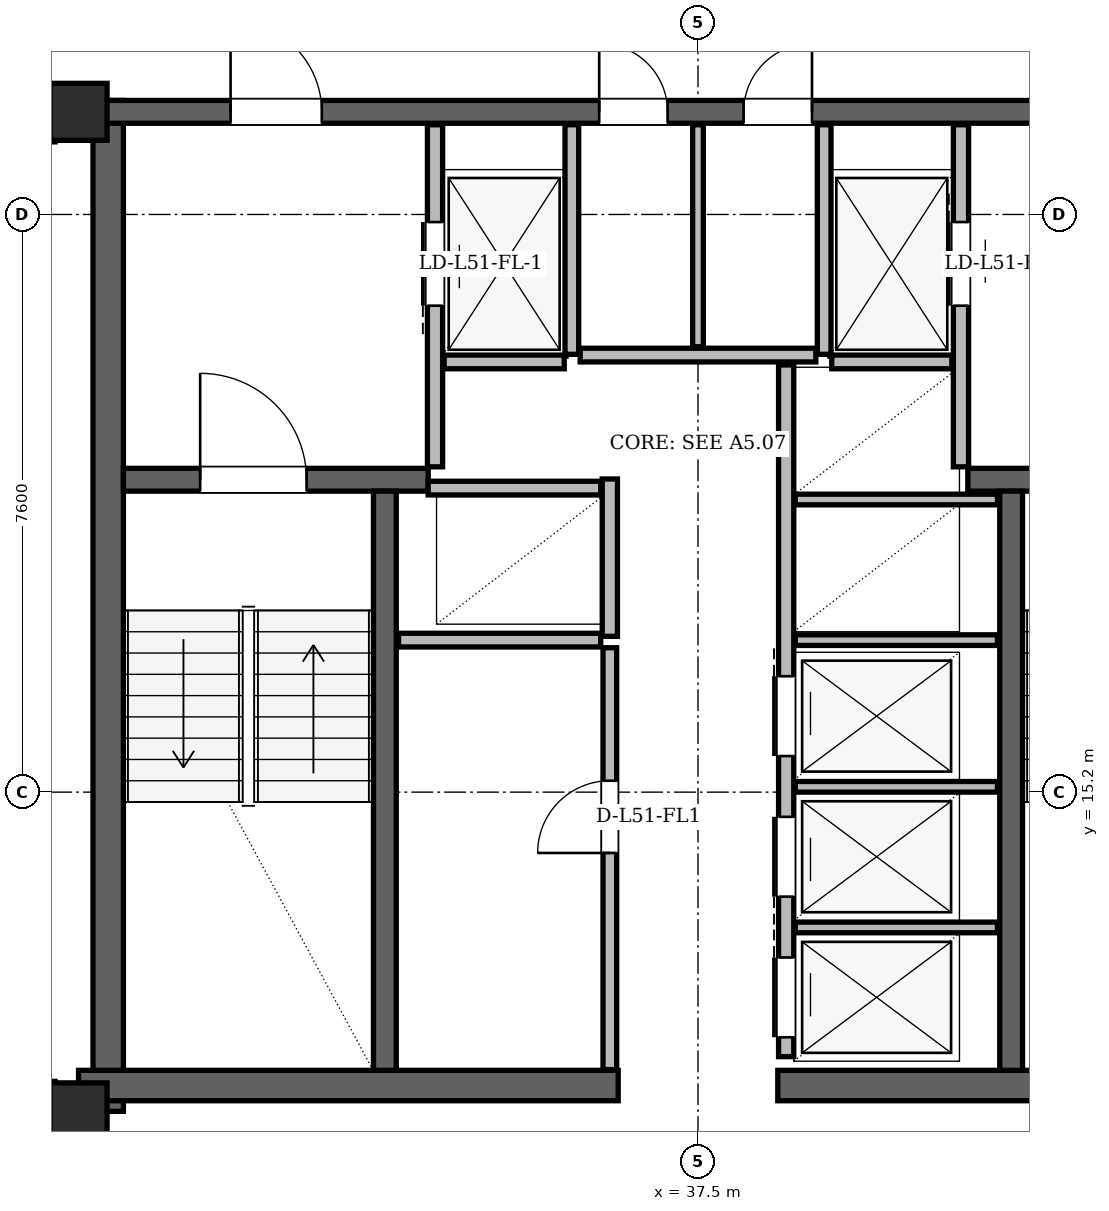
"""IFC4 building model, lengths in metres.
Left out: names, types, materials, properties, quantities, classifications, styles, units other than length and angle.
Written with IfcOpenShell. Run it as: python <this file> out.ifc"""

import sys

from ifc_helpers import new_model, si_unit, direction, frame, frame_2d, origin, origin_2d, place, context, subcontext, project, spatial, rectangle, hollow_rectangle, extrude, element, fill, save


model = new_model("IFC4")
c1 = context("Model", 3, precision=1e-05, world=origin(), true_north=direction((0.0, 1.0)))
c2 = subcontext(c1, "Body", "Model", "MODEL_VIEW")
j1 = project(units=[si_unit("LENGTHUNIT", "METRE"), si_unit("PLANEANGLEUNIT", "RADIAN")], contexts=[c1])
p1 = place(None, origin())
s1 = spatial("IfcSite", under=j1, at=p1, CompositionType="ELEMENT")
p2 = place(p1, origin())
s2 = spatial("IfcBuilding", under=s1, at=p2, CompositionType="ELEMENT")
p3 = place(p2, frame((0.0, 0.0, 193.8)))
s3 = spatial("IfcBuildingStorey", under=s2, at=p3, CompositionType="ELEMENT", Elevation=193.8)
for number, where, z_axis, x_axis in (
    (1, (29.35, 11.0, 0.0), (0.0, 0.0, 1.0), (1.0, 0.0, 0.0)),
    (2, (29.35, 24.15, 0.0), (0.0, 0.0, 1.0), (1.0, 0.0, 0.0)),
):
    element("IfcColumn", number, at=place(p3, frame(where, z_axis=z_axis, x_axis=x_axis)), inside=s3, PredefinedType="COLUMN", context=c2, shape_type="SweptSolid", body=[
        extrude(hollow_rectangle(XDim=0.75, YDim=0.75, WallThickness=0.06, at=origin_2d()), origin(), (0.0, 0.0, 1.0), 3.6),
    ])
p4 = place(p3, frame((29.74, 11.0, 0.0), z_axis=(0.0, 0.0, 1.0), x_axis=(0.0, 1.0, 0.0)))
e3 = element("IfcWall", 3, at=p4, inside=s3, PredefinedType="SHEAR", context=c2, shape_type="SweptSolid", body=[
    extrude(rectangle(XDim=13.3, YDim=0.4, at=frame_2d((6.65, 0.0))), origin(), (0.0, 0.0, 1.0), 3.38),
])
for number, where, z_axis, x_axis in (
    (4, (29.35, 11.34, 0.0), (0.0, 0.0, 1.0), (1.0, 0.0, 0.0)),
    (5, (38.55, 11.34, 0.0), (0.0, 0.0, 1.0), (1.0, 0.0, 0.0)),
):
    element("IfcWall", number, at=place(p3, frame(where, z_axis=z_axis, x_axis=x_axis)), inside=s3, PredefinedType="SHEAR", context=c2, shape_type="SweptSolid", body=[
        extrude(rectangle(XDim=7.1, YDim=0.4, at=frame_2d((3.55, 0.0))), origin(), (0.0, 0.0, 1.0), 3.38),
    ])
p5 = place(p3, frame((29.65, 24.15, 0.0), z_axis=(0.0, 0.0, 1.0), x_axis=(1.0, 0.0, 0.0)))
e6 = element("IfcWall", 6, at=p5, inside=s3, PredefinedType="SHEAR", context=c2, shape_type="SweptSolid", body=[
    extrude(rectangle(XDim=15.7, YDim=0.3, at=frame_2d((7.85, 0.0))), origin(), (0.0, 0.0, 1.0), 3.38),
])
p6 = place(p5, frame((1.7, 0.0, 0.0)))
e7 = element("IfcOpeningElement", 7, at=p6, cuts=e6, PredefinedType="OPENING", context=c2, shape_type="SweptSolid", body=[
    extrude(rectangle(XDim=1.2, YDim=2.2, at=frame_2d((0.6, 1.1))), frame((0.0, 0.15, 0.0), z_axis=(0.0, -1.0, 0.0), x_axis=(1.0, 0.0, 0.0)), (0.0, 0.0, 1.0), 0.3),
])
p7 = place(p5, frame((12.8, 0.0, 0.0)))
e8 = element("IfcOpeningElement", 8, at=p7, cuts=e6, PredefinedType="OPENING", context=c2, shape_type="SweptSolid", body=[
    extrude(rectangle(XDim=1.2, YDim=2.2, at=frame_2d((0.6, 1.1))), frame((0.0, 0.15, 0.0), z_axis=(0.0, -1.0, 0.0), x_axis=(1.0, 0.0, 0.0)), (0.0, 0.0, 1.0), 0.3),
])
p8 = place(p5, frame((6.55, 0.0, 0.0)))
e9 = element("IfcOpeningElement", 9, at=p8, cuts=e6, PredefinedType="OPENING", context=c2, shape_type="SweptSolid", body=[
    extrude(rectangle(XDim=0.9, YDim=2.05, at=frame_2d((0.45, 1.025))), frame((0.0, 0.15, 0.0), z_axis=(0.0, -1.0, 0.0), x_axis=(1.0, 0.0, 0.0)), (0.0, 0.0, 1.0), 0.3),
])
p9 = place(p5, frame((8.45, 0.0, 0.0)))
e10 = element("IfcOpeningElement", 10, at=p9, cuts=e6, PredefinedType="OPENING", context=c2, shape_type="SweptSolid", body=[
    extrude(rectangle(XDim=0.9, YDim=2.05, at=frame_2d((0.45, 1.025))), frame((0.0, 0.15, 0.0), z_axis=(0.0, -1.0, 0.0), x_axis=(1.0, 0.0, 0.0)), (0.0, 0.0, 1.0), 0.3),
])
p10 = place(p3, frame((29.94, 19.31, 0.0), z_axis=(0.0, 0.0, 1.0), x_axis=(1.0, 0.0, 0.0)))
e11 = element("IfcWall", 11, at=p10, inside=s3, PredefinedType="SHEAR", context=c2, shape_type="SweptSolid", body=[
    extrude(rectangle(XDim=4.01, YDim=0.3, at=frame_2d((2.005, 0.0))), origin(), (0.0, 0.0, 1.0), 3.38),
])
p11 = place(p10, frame((1.01, 0.0, 0.0)))
e12 = element("IfcOpeningElement", 12, at=p11, cuts=e11, PredefinedType="OPENING", context=c2, shape_type="SweptSolid", body=[
    extrude(rectangle(XDim=1.4, YDim=2.2, at=frame_2d((0.7, 1.1))), frame((0.0, 0.15, 0.0), z_axis=(0.0, -1.0, 0.0), x_axis=(1.0, 0.0, 0.0)), (0.0, 0.0, 1.0), 0.3),
])
p12 = place(p3, frame((41.05, 19.31, 0.0), z_axis=(0.0, 0.0, 1.0), x_axis=(1.0, 0.0, 0.0)))
e13 = element("IfcWall", 13, at=p12, inside=s3, PredefinedType="SHEAR", context=c2, shape_type="SweptSolid", body=[
    extrude(rectangle(XDim=4.01, YDim=0.3, at=frame_2d((2.005, 0.0))), origin(), (0.0, 0.0, 1.0), 3.38),
])
p13 = place(p12, frame((1.6, 0.0, 0.0)))
e14 = element("IfcOpeningElement", 14, at=p13, cuts=e13, PredefinedType="OPENING", context=c2, shape_type="SweptSolid", body=[
    extrude(rectangle(XDim=1.4, YDim=2.2, at=frame_2d((0.7, 1.1))), frame((0.0, 0.15, 0.0), z_axis=(0.0, -1.0, 0.0), x_axis=(1.0, 0.0, 0.0)), (0.0, 0.0, 1.0), 0.3),
])
for number, where, z_axis, x_axis in (
    (15, (33.38, 11.54, 0.0), (0.0, 0.0, 1.0), (0.0, 1.0, 0.0)),
    (16, (41.62, 11.54, 0.0), (0.0, 0.0, 1.0), (0.0, 1.0, 0.0)),
):
    element("IfcWall", number, at=place(p3, frame(where, z_axis=z_axis, x_axis=x_axis)), inside=s3, PredefinedType="SHEAR", context=c2, shape_type="SweptSolid", body=[
        extrude(rectangle(XDim=7.62, YDim=0.3, at=frame_2d((3.81, 0.0))), origin(), (0.0, 0.0, 1.0), 3.38),
    ])
p14 = place(p3, frame((59.426, 11.839, 0.0), z_axis=(0.0, 0.0, 1.0), x_axis=(-0.499997159266, 0.866027043877, 0.0)))
e17 = element("IfcWall", 17, at=p14, inside=s3, PredefinedType="SOLIDWALL", context=c2, shape_type="SweptSolid", body=[
    extrude(rectangle(XDim=36.235, YDim=0.29, at=frame_2d((18.117, 0.0))), origin(), (0.0, 0.0, 1.0), 2.677),
])
p15 = place(p14, frame((6.579, 0.0, 0.0)))
e18 = element("IfcOpeningElement", 18, at=p15, cuts=e17, PredefinedType="OPENING", context=c2, shape_type="SweptSolid", body=[
    extrude(rectangle(XDim=1.5, YDim=2.2, at=frame_2d((0.75, 1.1))), frame((0.0, 0.145, 0.0), z_axis=(0.0, -1.0, 0.0), x_axis=(1.0, 0.0, 0.0)), (0.0, 0.0, 1.0), 0.29),
])
p16 = place(p14, frame((26.7, 0.0, 0.0)))
e19 = element("IfcOpeningElement", 19, at=p16, cuts=e17, PredefinedType="OPENING", context=c2, shape_type="SweptSolid", body=[
    extrude(rectangle(XDim=1.5, YDim=2.2, at=frame_2d((0.75, 1.1))), frame((0.0, 0.145, 0.0), z_axis=(0.0, -1.0, 0.0), x_axis=(1.0, 0.0, 0.0)), (0.0, 0.0, 1.0), 0.29),
])
p17 = place(p14, frame((34.18, 0.0, 0.85)))
e20 = element("IfcOpeningElement", 20, at=p17, cuts=e17, PredefinedType="OPENING", context=c2, shape_type="SweptSolid", body=[
    extrude(rectangle(XDim=1.2, YDim=1.48, at=frame_2d((0.6, 0.74))), frame((0.0, 0.145, 0.0), z_axis=(0.0, -1.0, 0.0), x_axis=(1.0, 0.0, 0.0)), (0.0, 0.0, 1.0), 0.29),
])
p18 = place(p14, frame((16.442, 0.0, 0.85)))
e21 = element("IfcOpeningElement", 21, at=p18, cuts=e17, PredefinedType="OPENING", context=c2, shape_type="SweptSolid", body=[
    extrude(rectangle(XDim=2.5, YDim=1.717, at=frame_2d((1.25, 0.858))), frame((0.0, 0.145, 0.0), z_axis=(0.0, -1.0, 0.0), x_axis=(1.0, 0.0, 0.0)), (0.0, 0.0, 1.0), 0.29),
])
p19 = place(p3, frame((33.691, 43.219, 0.0), z_axis=(0.0, 0.0, 1.0), x_axis=(-0.499997159266, -0.866027043877, 0.0)))
e22 = element("IfcWall", 22, at=p19, inside=s3, PredefinedType="SOLIDWALL", context=c2, shape_type="SweptSolid", body=[
    extrude(rectangle(XDim=36.235, YDim=0.29, at=frame_2d((18.117, 0.0))), origin(), (0.0, 0.0, 1.0), 2.677),
])
p20 = place(p19, frame((6.579, 0.0, 0.0)))
e23 = element("IfcOpeningElement", 23, at=p20, cuts=e22, PredefinedType="OPENING", context=c2, shape_type="SweptSolid", body=[
    extrude(rectangle(XDim=1.5, YDim=2.2, at=frame_2d((0.75, 1.1))), frame((0.0, 0.145, 0.0), z_axis=(0.0, -1.0, 0.0), x_axis=(1.0, 0.0, 0.0)), (0.0, 0.0, 1.0), 0.29),
])
p21 = place(p19, frame((26.7, 0.0, 0.0)))
e24 = element("IfcOpeningElement", 24, at=p21, cuts=e22, PredefinedType="OPENING", context=c2, shape_type="SweptSolid", body=[
    extrude(rectangle(XDim=1.5, YDim=2.2, at=frame_2d((0.75, 1.1))), frame((0.0, 0.145, 0.0), z_axis=(0.0, -1.0, 0.0), x_axis=(1.0, 0.0, 0.0)), (0.0, 0.0, 1.0), 0.29),
])
p22 = place(p19, frame((32.74, 0.0, 0.85)))
e25 = element("IfcOpeningElement", 25, at=p22, cuts=e22, PredefinedType="OPENING", context=c2, shape_type="SweptSolid", body=[
    extrude(rectangle(XDim=2.4, YDim=1.717, at=frame_2d((1.2, 0.858))), frame((0.0, 0.145, 0.0), z_axis=(0.0, -1.0, 0.0), x_axis=(1.0, 0.0, 0.0)), (0.0, 0.0, 1.0), 0.29),
])
p23 = place(p19, frame((21.971, 0.0, 0.85)))
e26 = element("IfcOpeningElement", 26, at=p23, cuts=e22, PredefinedType="OPENING", context=c2, shape_type="SweptSolid", body=[
    extrude(rectangle(XDim=2.0, YDim=1.717, at=frame_2d((1.0, 0.858))), frame((0.0, 0.145, 0.0), z_axis=(0.0, -1.0, 0.0), x_axis=(1.0, 0.0, 0.0)), (0.0, 0.0, 1.0), 0.29),
])
p24 = place(p19, frame((2.383, 0.0, 0.85)))
e27 = element("IfcOpeningElement", 27, at=p24, cuts=e22, PredefinedType="OPENING", context=c2, shape_type="SweptSolid", body=[
    extrude(rectangle(XDim=1.6, YDim=1.7, at=frame_2d((0.8, 0.85))), frame((0.0, 0.145, 0.0), z_axis=(0.0, -1.0, 0.0), x_axis=(1.0, 0.0, 0.0)), (0.0, 0.0, 1.0), 0.29),
])
p25 = place(p19, frame((13.348, 0.0, 0.85)))
e28 = element("IfcOpeningElement", 28, at=p25, cuts=e22, PredefinedType="OPENING", context=c2, shape_type="SweptSolid", body=[
    extrude(rectangle(XDim=3.0, YDim=1.717, at=frame_2d((1.5, 0.858))), frame((0.0, 0.145, 0.0), z_axis=(0.0, -1.0, 0.0), x_axis=(1.0, 0.0, 0.0)), (0.0, 0.0, 1.0), 0.29),
])
p26 = place(p3, frame((34.04, 19.48, 0.0), z_axis=(0.0, 0.0, 1.0), x_axis=(0.0, 1.0, 0.0)))
e29 = element("IfcWall", 29, at=p26, inside=s3, PredefinedType="PARTITIONING", context=c2, shape_type="SweptSolid", body=[
    extrude(rectangle(XDim=4.5, YDim=0.2, at=frame_2d((2.25, 0.0))), origin(), (0.0, 0.0, 1.0), 3.38),
])
p27 = place(p26, frame((2.12, 0.0, 0.0)))
e30 = element("IfcOpeningElement", 30, at=p27, cuts=e29, PredefinedType="OPENING", context=c2, shape_type="SweptSolid", body=[
    extrude(rectangle(XDim=1.1, YDim=2.2, at=frame_2d((0.55, 1.1))), frame((0.0, 0.1, 0.0), z_axis=(0.0, -1.0, 0.0), x_axis=(1.0, 0.0, 0.0)), (0.0, 0.0, 1.0), 0.2),
])
p28 = place(p3, frame((35.84, 20.96, 0.0), z_axis=(0.0, 0.0, 1.0), x_axis=(0.0, 1.0, 0.0)))
e31 = element("IfcWall", 31, at=p28, inside=s3, PredefinedType="PARTITIONING", context=c2, shape_type="SweptSolid", body=[
    extrude(rectangle(XDim=3.02, YDim=0.18, at=frame_2d((1.51, 0.0))), origin(), (0.0, 0.0, 1.0), 3.38),
])
p29 = place(p3, frame((34.16, 20.86, 0.0), z_axis=(0.0, 0.0, 1.0), x_axis=(1.0, 0.0, 0.0)))
e32 = element("IfcWall", 32, at=p29, inside=s3, PredefinedType="PARTITIONING", context=c2, shape_type="SweptSolid", body=[
    extrude(rectangle(XDim=1.58, YDim=0.18, at=frame_2d((0.79, 0.0))), origin(), (0.0, 0.0, 1.0), 3.38),
])
p30 = place(p3, frame((40.96, 19.48, 0.0), z_axis=(0.0, 0.0, 1.0), x_axis=(0.0, 1.0, 0.0)))
e33 = element("IfcWall", 33, at=p30, inside=s3, PredefinedType="PARTITIONING", context=c2, shape_type="SweptSolid", body=[
    extrude(rectangle(XDim=4.5, YDim=0.2, at=frame_2d((2.25, 0.0))), origin(), (0.0, 0.0, 1.0), 3.38),
])
p31 = place(p30, frame((2.12, 0.0, 0.0)))
e34 = element("IfcOpeningElement", 34, at=p31, cuts=e33, PredefinedType="OPENING", context=c2, shape_type="SweptSolid", body=[
    extrude(rectangle(XDim=1.1, YDim=2.2, at=frame_2d((0.55, 1.1))), frame((0.0, 0.1, 0.0), z_axis=(0.0, -1.0, 0.0), x_axis=(1.0, 0.0, 0.0)), (0.0, 0.0, 1.0), 0.2),
])
p32 = place(p3, frame((39.16, 20.96, 0.0), z_axis=(0.0, 0.0, 1.0), x_axis=(0.0, 1.0, 0.0)))
e35 = element("IfcWall", 35, at=p32, inside=s3, PredefinedType="PARTITIONING", context=c2, shape_type="SweptSolid", body=[
    extrude(rectangle(XDim=3.02, YDim=0.18, at=frame_2d((1.51, 0.0))), origin(), (0.0, 0.0, 1.0), 3.38),
])
p33 = place(p3, frame((39.26, 20.86, 0.0), z_axis=(0.0, 0.0, 1.0), x_axis=(1.0, 0.0, 0.0)))
e36 = element("IfcWall", 36, at=p33, inside=s3, PredefinedType="PARTITIONING", context=c2, shape_type="SweptSolid", body=[
    extrude(rectangle(XDim=1.58, YDim=0.18, at=frame_2d((0.79, 0.0))), origin(), (0.0, 0.0, 1.0), 3.38),
])
p34 = place(p3, frame((36.34, 17.25, 0.0), z_axis=(0.0, 0.0, 1.0), x_axis=(0.0, 1.0, 0.0)))
e37 = element("IfcWall", 37, at=p34, inside=s3, PredefinedType="PARTITIONING", context=c2, shape_type="SweptSolid", body=[
    extrude(rectangle(XDim=2.07, YDim=0.2, at=frame_2d((1.035, 0.0))), origin(), (0.0, 0.0, 1.0), 3.38),
])
p35 = place(p3, frame((33.95, 19.2, 0.0), z_axis=(0.0, 0.0, 1.0), x_axis=(1.0, 0.0, 0.0)))
e38 = element("IfcWall", 38, at=p35, inside=s3, PredefinedType="PARTITIONING", context=c2, shape_type="SweptSolid", body=[
    extrude(rectangle(XDim=2.27, YDim=0.18, at=frame_2d((1.135, 0.0))), origin(), (0.0, 0.0, 1.0), 3.38),
])
p36 = place(p3, frame((33.56, 17.2, 0.0), z_axis=(0.0, 0.0, 1.0), x_axis=(1.0, 0.0, 0.0)))
e39 = element("IfcWall", 39, at=p36, inside=s3, PredefinedType="PARTITIONING", context=c2, shape_type="SweptSolid", body=[
    extrude(rectangle(XDim=2.66, YDim=0.18, at=frame_2d((1.33, 0.0))), origin(), (0.0, 0.0, 1.0), 3.38),
])
p37 = place(p3, frame((36.34, 11.55, 0.0), z_axis=(0.0, 0.0, 1.0), x_axis=(0.0, 1.0, 0.0)))
e40 = element("IfcWall", 40, at=p37, inside=s3, PredefinedType="PARTITIONING", context=c2, shape_type="SweptSolid", body=[
    extrude(rectangle(XDim=5.55, YDim=0.18, at=frame_2d((2.775, 0.0))), origin(), (0.0, 0.0, 1.0), 3.38),
])
p38 = place(p37, frame((2.85, 0.0, 0.0)))
e41 = element("IfcOpeningElement", 41, at=p38, cuts=e40, PredefinedType="OPENING", context=c2, shape_type="SweptSolid", body=[
    extrude(rectangle(XDim=0.95, YDim=2.1, at=frame_2d((0.475, 1.05))), frame((0.0, 0.09, 0.0), z_axis=(0.0, -1.0, 0.0), x_axis=(1.0, 0.0, 0.0)), (0.0, 0.0, 1.0), 0.18),
])
p39 = place(p3, frame((38.66, 11.72, 0.0), z_axis=(0.0, 0.0, 1.0), x_axis=(0.0, 1.0, 0.0)))
e42 = element("IfcWall", 42, at=p39, inside=s3, PredefinedType="PARTITIONING", context=c2, shape_type="SweptSolid", body=[
    extrude(rectangle(XDim=9.1, YDim=0.2, at=frame_2d((4.55, 0.0))), origin(), (0.0, 0.0, 1.0), 3.38),
])
p40 = place(p39, frame((0.255, 0.0, 0.0)))
e43 = element("IfcOpeningElement", 43, at=p40, cuts=e42, PredefinedType="OPENING", context=c2, shape_type="SweptSolid", body=[
    extrude(rectangle(XDim=1.05, YDim=2.15, at=frame_2d((0.525, 1.075))), frame((0.0, 0.1, 0.0), z_axis=(0.0, -1.0, 0.0), x_axis=(1.0, 0.0, 0.0)), (0.0, 0.0, 1.0), 0.2),
])
p41 = place(p39, frame((2.105, 0.0, 0.0)))
e44 = element("IfcOpeningElement", 44, at=p41, cuts=e42, PredefinedType="OPENING", context=c2, shape_type="SweptSolid", body=[
    extrude(rectangle(XDim=1.05, YDim=2.15, at=frame_2d((0.525, 1.075))), frame((0.0, 0.1, 0.0), z_axis=(0.0, -1.0, 0.0), x_axis=(1.0, 0.0, 0.0)), (0.0, 0.0, 1.0), 0.2),
])
p42 = place(p39, frame((3.955, 0.0, 0.0)))
e45 = element("IfcOpeningElement", 45, at=p42, cuts=e42, PredefinedType="OPENING", context=c2, shape_type="SweptSolid", body=[
    extrude(rectangle(XDim=1.05, YDim=2.15, at=frame_2d((0.525, 1.075))), frame((0.0, 0.1, 0.0), z_axis=(0.0, -1.0, 0.0), x_axis=(1.0, 0.0, 0.0)), (0.0, 0.0, 1.0), 0.2),
])
for number, where, z_axis, x_axis in (
    (46, (38.78, 13.42, 0.0), (0.0, 0.0, 1.0), (1.0, 0.0, 0.0)),
    (47, (38.78, 15.27, 0.0), (0.0, 0.0, 1.0), (1.0, 0.0, 0.0)),
    (48, (38.78, 17.2, 0.0), (0.0, 0.0, 1.0), (1.0, 0.0, 0.0)),
    (49, (38.78, 19.05, 0.0), (0.0, 0.0, 1.0), (1.0, 0.0, 0.0)),
):
    element("IfcWall", number, at=place(p3, frame(where, z_axis=z_axis, x_axis=x_axis)), inside=s3, PredefinedType="PARTITIONING", context=c2, shape_type="SweptSolid", body=[
        extrude(rectangle(XDim=2.66, YDim=0.14, at=frame_2d((1.33, 0.0))), origin(), (0.0, 0.0, 1.0), 3.38),
    ])
p43 = place(p3, frame((35.95, 20.95, 0.0), z_axis=(0.0, 0.0, 1.0), x_axis=(1.0, 0.0, 0.0)))
e50 = element("IfcWall", 50, at=p43, inside=s3, PredefinedType="PARTITIONING", context=c2, shape_type="SweptSolid", body=[
    extrude(rectangle(XDim=3.1, YDim=0.18, at=frame_2d((1.55, 0.0))), origin(), (0.0, 0.0, 1.0), 3.38),
])
p44 = place(p3, frame((37.5, 21.06, 0.0), z_axis=(0.0, 0.0, 1.0), x_axis=(0.0, 1.0, 0.0)))
e51 = element("IfcWall", 51, at=p44, inside=s3, PredefinedType="PARTITIONING", context=c2, shape_type="SweptSolid", body=[
    extrude(rectangle(XDim=2.92, YDim=0.14, at=frame_2d((1.46, 0.0))), origin(), (0.0, 0.0, 1.0), 3.38),
])
p45 = place(p3, frame((28.95, 10.95, 0.0), z_axis=(0.0, 0.0, 1.0), x_axis=(0.0, 1.0, 0.0)))
e52 = element("IfcWall", 52, at=p45, inside=s3, PredefinedType="PARTITIONING", context=c2, shape_type="SweptSolid", body=[
    extrude(rectangle(XDim=0.445, YDim=0.18, at=frame_2d((0.223, 0.0))), origin(), (0.0, 0.0, 1.0), 2.913),
])
p46 = place(p3, frame((28.95, 23.755, 0.0), z_axis=(0.0, 0.0, 1.0), x_axis=(0.0, 1.0, 0.0)))
e53 = element("IfcWall", 53, at=p46, inside=s3, PredefinedType="PARTITIONING", context=c2, shape_type="SweptSolid", body=[
    extrude(rectangle(XDim=0.565, YDim=0.18, at=frame_2d((0.283, 0.0))), origin(), (0.0, 0.0, 1.0), 3.38),
])
p47 = place(p38, origin())
e54 = element("IfcDoor", 54, at=p47, inside=s3, OperationType="SINGLE_SWING_LEFT", PredefinedType="DOOR", context=c2, shape_type="SweptSolid", body=[
    extrude(rectangle(XDim=0.95, YDim=2.1, at=frame_2d((0.475, 1.05))), frame((0.0, 0.025, 0.0), z_axis=(0.0, -1.0, 0.0), x_axis=(1.0, 0.0, 0.0)), (0.0, 0.0, 1.0), 0.05),
])
fill(e41, e54)
p48 = place(p27, origin())
e55 = element("IfcDoor", 55, at=p48, inside=s3, OperationType="SLIDING_TO_LEFT", PredefinedType="DOOR", context=c2, shape_type="SweptSolid", body=[
    extrude(rectangle(XDim=1.1, YDim=2.2, at=frame_2d((0.55, 1.1))), frame((0.0, 0.025, 0.0), z_axis=(0.0, -1.0, 0.0), x_axis=(1.0, 0.0, 0.0)), (0.0, 0.0, 1.0), 0.05),
])
fill(e30, e55)
p49 = place(p31, origin())
e56 = element("IfcDoor", 56, at=p49, inside=s3, OperationType="SLIDING_TO_RIGHT", PredefinedType="DOOR", context=c2, shape_type="SweptSolid", body=[
    extrude(rectangle(XDim=1.1, YDim=2.2, at=frame_2d((0.55, 1.1))), frame((0.0, 0.025, 0.0), z_axis=(0.0, -1.0, 0.0), x_axis=(1.0, 0.0, 0.0)), (0.0, 0.0, 1.0), 0.05),
])
fill(e34, e56)
p50 = place(p40, origin())
e57 = element("IfcDoor", 57, at=p50, inside=s3, OperationType="SLIDING_TO_RIGHT", PredefinedType="DOOR", context=c2, shape_type="SweptSolid", body=[
    extrude(rectangle(XDim=1.05, YDim=2.15, at=frame_2d((0.525, 1.075))), frame((0.0, 0.025, 0.0), z_axis=(0.0, -1.0, 0.0), x_axis=(1.0, 0.0, 0.0)), (0.0, 0.0, 1.0), 0.05),
])
fill(e43, e57)
p51 = place(p41, origin())
e58 = element("IfcDoor", 58, at=p51, inside=s3, OperationType="SLIDING_TO_LEFT", PredefinedType="DOOR", context=c2, shape_type="SweptSolid", body=[
    extrude(rectangle(XDim=1.05, YDim=2.15, at=frame_2d((0.525, 1.075))), frame((0.0, 0.025, 0.0), z_axis=(0.0, -1.0, 0.0), x_axis=(1.0, 0.0, 0.0)), (0.0, 0.0, 1.0), 0.05),
])
fill(e44, e58)
p52 = place(p42, origin())
e59 = element("IfcDoor", 59, at=p52, inside=s3, OperationType="SLIDING_TO_RIGHT", PredefinedType="DOOR", context=c2, shape_type="SweptSolid", body=[
    extrude(rectangle(XDim=1.05, YDim=2.15, at=frame_2d((0.525, 1.075))), frame((0.0, 0.025, 0.0), z_axis=(0.0, -1.0, 0.0), x_axis=(1.0, 0.0, 0.0)), (0.0, 0.0, 1.0), 0.05),
])
fill(e45, e59)
p53 = place(p11, origin())
e60 = element("IfcDoor", 60, at=p53, inside=s3, OperationType="SINGLE_SWING_LEFT", PredefinedType="DOOR", context=c2, shape_type="SweptSolid", body=[
    extrude(rectangle(XDim=1.4, YDim=2.2, at=frame_2d((0.7, 1.1))), frame((0.0, 0.025, 0.0), z_axis=(0.0, -1.0, 0.0), x_axis=(1.0, 0.0, 0.0)), (0.0, 0.0, 1.0), 0.05),
])
fill(e12, e60)
p54 = place(p6, origin())
e61 = element("IfcDoor", 61, at=p54, inside=s3, OperationType="SINGLE_SWING_LEFT", PredefinedType="DOOR", context=c2, shape_type="SweptSolid", body=[
    extrude(rectangle(XDim=1.2, YDim=2.2, at=frame_2d((0.6, 1.1))), frame((0.0, 0.025, 0.0), z_axis=(0.0, -1.0, 0.0), x_axis=(1.0, 0.0, 0.0)), (0.0, 0.0, 1.0), 0.05),
])
fill(e7, e61)
p55 = place(p8, origin())
e62 = element("IfcDoor", 62, at=p55, inside=s3, OperationType="SINGLE_SWING_LEFT", PredefinedType="DOOR", context=c2, shape_type="SweptSolid", body=[
    extrude(rectangle(XDim=0.9, YDim=2.05, at=frame_2d((0.45, 1.025))), frame((0.0, 0.025, 0.0), z_axis=(0.0, -1.0, 0.0), x_axis=(1.0, 0.0, 0.0)), (0.0, 0.0, 1.0), 0.05),
])
fill(e9, e62)
p56 = place(p9, origin())
e63 = element("IfcDoor", 63, at=p56, inside=s3, OperationType="SINGLE_SWING_RIGHT", PredefinedType="DOOR", context=c2, shape_type="SweptSolid", body=[
    extrude(rectangle(XDim=0.9, YDim=2.05, at=frame_2d((0.45, 1.025))), frame((0.0, 0.025, 0.0), z_axis=(0.0, -1.0, 0.0), x_axis=(1.0, 0.0, 0.0)), (0.0, 0.0, 1.0), 0.05),
])
fill(e10, e63)
save(model, sys.argv[1])
